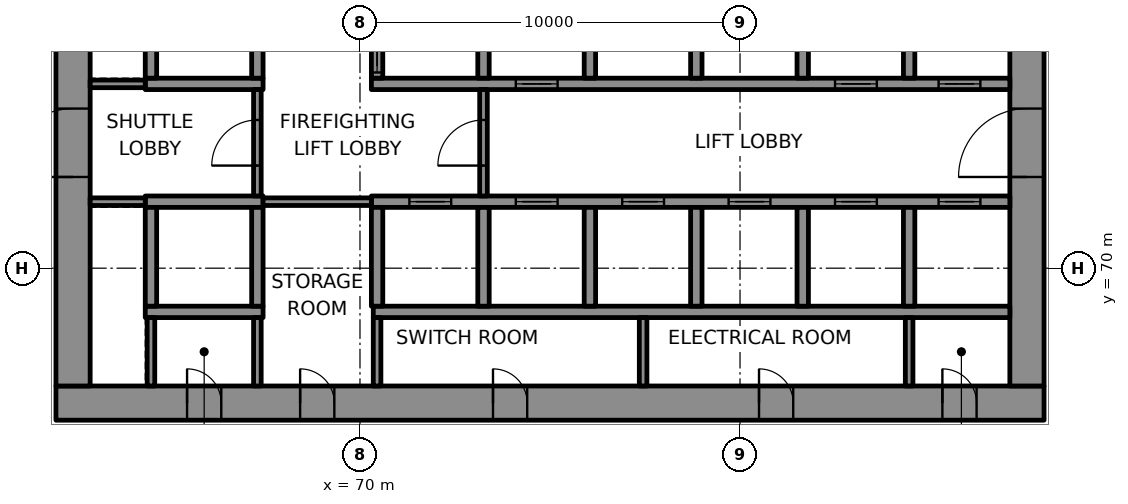
"""IFC4 building model, lengths in metres.
Left out: names, types, materials, properties, quantities, classifications, styles, units other than length and angle.
Written with IfcOpenShell. Run it as: python <this file> out.ifc"""

import sys

from ifc_helpers import new_model, si_unit, direction, frame, frame_2d, origin, place, context, subcontext, project, spatial, rectangle, extrude, element, fill, save


model = new_model("IFC4")
c1 = context("Model", 3, precision=1e-05, world=origin(), true_north=direction((0.0, 1.0)))
c2 = subcontext(c1, "Body", "Model", "MODEL_VIEW")
j1 = project(units=[si_unit("LENGTHUNIT", "METRE"), si_unit("PLANEANGLEUNIT", "RADIAN")], contexts=[c1])
p1 = place(None, origin())
s1 = spatial("IfcSite", under=j1, at=p1, CompositionType="ELEMENT")
p2 = place(p1, origin())
s2 = spatial("IfcBuilding", under=s1, at=p2, CompositionType="ELEMENT")
p3 = place(p2, frame((0.0, 0.0, 56.8)))
s3 = spatial("IfcBuildingStorey", under=s2, at=p3, CompositionType="ELEMENT", Elevation=56.8)
p4 = place(p3, frame((62.0, 66.45, 0.0), z_axis=(0.0, 0.0, 1.0), x_axis=(1.0, 0.0, 0.0)))
e1 = element("IfcWall", 1, at=p4, inside=s3, PredefinedType="SHEAR", context=c2, shape_type="SweptSolid", body=[
    extrude(rectangle(XDim=26.0, YDim=0.9, at=frame_2d((13.0, 0.0))), origin(), (0.0, 0.0, 1.0), 4.0),
])
p5 = place(p4, frame((3.45, 0.0, 0.0)))
e2 = element("IfcOpeningElement", 2, at=p5, cuts=e1, PredefinedType="OPENING", context=c2, shape_type="SweptSolid", body=[
    extrude(rectangle(XDim=0.9, YDim=2.1, at=frame_2d((0.45, 1.05))), frame((0.0, 0.46, 0.0), z_axis=(0.0, -1.0, 0.0), x_axis=(1.0, 0.0, 0.0)), (0.0, 0.0, 1.0), 0.92),
])
p6 = place(p4, frame((6.425, 0.0, 0.0)))
e3 = element("IfcOpeningElement", 3, at=p6, cuts=e1, PredefinedType="OPENING", context=c2, shape_type="SweptSolid", body=[
    extrude(rectangle(XDim=0.9, YDim=2.1, at=frame_2d((0.45, 1.05))), frame((0.0, 0.46, 0.0), z_axis=(0.0, -1.0, 0.0), x_axis=(1.0, 0.0, 0.0)), (0.0, 0.0, 1.0), 0.92),
])
p7 = place(p4, frame((11.5, 0.0, 0.0)))
e4 = element("IfcOpeningElement", 4, at=p7, cuts=e1, PredefinedType="OPENING", context=c2, shape_type="SweptSolid", body=[
    extrude(rectangle(XDim=0.9, YDim=2.1, at=frame_2d((0.45, 1.05))), frame((0.0, 0.46, 0.0), z_axis=(0.0, -1.0, 0.0), x_axis=(1.0, 0.0, 0.0)), (0.0, 0.0, 1.0), 0.92),
])
p8 = place(p4, frame((18.5, 0.0, 0.0)))
e5 = element("IfcOpeningElement", 5, at=p8, cuts=e1, PredefinedType="OPENING", context=c2, shape_type="SweptSolid", body=[
    extrude(rectangle(XDim=0.9, YDim=2.1, at=frame_2d((0.45, 1.05))), frame((0.0, 0.46, 0.0), z_axis=(0.0, -1.0, 0.0), x_axis=(1.0, 0.0, 0.0)), (0.0, 0.0, 1.0), 0.92),
])
p9 = place(p4, frame((23.325, 0.0, 0.0)))
e6 = element("IfcOpeningElement", 6, at=p9, cuts=e1, PredefinedType="OPENING", context=c2, shape_type="SweptSolid", body=[
    extrude(rectangle(XDim=0.9, YDim=2.1, at=frame_2d((0.45, 1.05))), frame((0.0, 0.46, 0.0), z_axis=(0.0, -1.0, 0.0), x_axis=(1.0, 0.0, 0.0)), (0.0, 0.0, 1.0), 0.92),
])
p10 = place(p3, frame((62.45, 66.9, 0.0), z_axis=(0.0, 0.0, 1.0), x_axis=(0.0, 1.0, 0.0)))
e7 = element("IfcWall", 7, at=p10, inside=s3, PredefinedType="SHEAR", context=c2, shape_type="SweptSolid", body=[
    extrude(rectangle(XDim=16.2, YDim=0.9, at=frame_2d((8.1, 0.0))), origin(), (0.0, 0.0, 1.0), 4.0),
])
p11 = place(p10, frame((5.5, 0.0, 0.0)))
e8 = element("IfcOpeningElement", 8, at=p11, cuts=e7, PredefinedType="OPENING", context=c2, shape_type="SweptSolid", body=[
    extrude(rectangle(XDim=1.8, YDim=2.1, at=frame_2d((0.9, 1.05))), frame((0.0, 0.46, 0.0), z_axis=(0.0, -1.0, 0.0), x_axis=(1.0, 0.0, 0.0)), (0.0, 0.0, 1.0), 0.92),
])
p12 = place(p3, frame((87.55, 66.9, 0.0), z_axis=(0.0, 0.0, 1.0), x_axis=(0.0, 1.0, 0.0)))
e9 = element("IfcWall", 9, at=p12, inside=s3, PredefinedType="SHEAR", context=c2, shape_type="SweptSolid", body=[
    extrude(rectangle(XDim=16.2, YDim=0.9, at=frame_2d((8.1, 0.0))), origin(), (0.0, 0.0, 1.0), 4.0),
])
p13 = place(p12, frame((5.5, 0.0, 0.0)))
e10 = element("IfcOpeningElement", 10, at=p13, cuts=e9, PredefinedType="OPENING", context=c2, shape_type="SweptSolid", body=[
    extrude(rectangle(XDim=1.8, YDim=2.1, at=frame_2d((0.9, 1.05))), frame((0.0, 0.46, 0.0), z_axis=(0.0, -1.0, 0.0), x_axis=(1.0, 0.0, 0.0)), (0.0, 0.0, 1.0), 0.92),
])
p14 = place(p12, frame((12.272, 0.0, 0.0)))
e11 = element("IfcOpeningElement", 11, at=p14, cuts=e9, PredefinedType="OPENING", context=c2, shape_type="SweptSolid", body=[
    extrude(rectangle(XDim=0.9, YDim=2.1, at=frame_2d((0.45, 1.05))), frame((0.0, 0.46, 0.0), z_axis=(0.0, -1.0, 0.0), x_axis=(1.0, 0.0, 0.0)), (0.0, 0.0, 1.0), 0.92),
])
p15 = place(p3, frame((64.35, 68.85, 0.0), z_axis=(0.0, 0.0, 1.0), x_axis=(1.0, 0.0, 0.0)))
e12 = element("IfcWall", 12, at=p15, inside=s3, PredefinedType="SHEAR", context=c2, shape_type="SweptSolid", body=[
    extrude(rectangle(XDim=3.1, YDim=0.3, at=frame_2d((1.55, 0.0))), origin(), (0.0, 0.0, 1.0), 4.0),
])
p16 = place(p3, frame((70.35, 68.85, 0.0), z_axis=(0.0, 0.0, 1.0), x_axis=(1.0, 0.0, 0.0)))
e13 = element("IfcWall", 13, at=p16, inside=s3, PredefinedType="SHEAR", context=c2, shape_type="SweptSolid", body=[
    extrude(rectangle(XDim=16.75, YDim=0.3, at=frame_2d((8.375, 0.0))), origin(), (0.0, 0.0, 1.0), 4.0),
])
p17 = place(p3, frame((64.35, 71.75, 0.0), z_axis=(0.0, 0.0, 1.0), x_axis=(1.0, 0.0, 0.0)))
e14 = element("IfcWall", 14, at=p17, inside=s3, PredefinedType="SHEAR", context=c2, shape_type="SweptSolid", body=[
    extrude(rectangle(XDim=3.1, YDim=0.3, at=frame_2d((1.55, 0.0))), origin(), (0.0, 0.0, 1.0), 4.0),
])
p18 = place(p3, frame((70.3, 71.75, 0.0), z_axis=(0.0, 0.0, 1.0), x_axis=(1.0, 0.0, 0.0)))
e15 = element("IfcWall", 15, at=p18, inside=s3, PredefinedType="SHEAR", context=c2, shape_type="SweptSolid", body=[
    extrude(rectangle(XDim=16.8, YDim=0.3, at=frame_2d((8.4, 0.0))), origin(), (0.0, 0.0, 1.0), 4.0),
])
p19 = place(p18, frame((1.0, 0.0, 0.0)))
e16 = element("IfcOpeningElement", 16, at=p19, cuts=e15, PredefinedType="OPENING", context=c2, shape_type="SweptSolid", body=[
    extrude(rectangle(XDim=1.1, YDim=2.1, at=frame_2d((0.55, 1.05))), frame((0.0, 0.16, 0.0), z_axis=(0.0, -1.0, 0.0), x_axis=(1.0, 0.0, 0.0)), (0.0, 0.0, 1.0), 0.32),
])
p20 = place(p18, frame((3.8, 0.0, 0.0)))
e17 = element("IfcOpeningElement", 17, at=p20, cuts=e15, PredefinedType="OPENING", context=c2, shape_type="SweptSolid", body=[
    extrude(rectangle(XDim=1.1, YDim=2.1, at=frame_2d((0.55, 1.05))), frame((0.0, 0.16, 0.0), z_axis=(0.0, -1.0, 0.0), x_axis=(1.0, 0.0, 0.0)), (0.0, 0.0, 1.0), 0.32),
])
p21 = place(p18, frame((6.6, 0.0, 0.0)))
e18 = element("IfcOpeningElement", 18, at=p21, cuts=e15, PredefinedType="OPENING", context=c2, shape_type="SweptSolid", body=[
    extrude(rectangle(XDim=1.1, YDim=2.1, at=frame_2d((0.55, 1.05))), frame((0.0, 0.16, 0.0), z_axis=(0.0, -1.0, 0.0), x_axis=(1.0, 0.0, 0.0)), (0.0, 0.0, 1.0), 0.32),
])
p22 = place(p18, frame((9.4, 0.0, 0.0)))
e19 = element("IfcOpeningElement", 19, at=p22, cuts=e15, PredefinedType="OPENING", context=c2, shape_type="SweptSolid", body=[
    extrude(rectangle(XDim=1.1, YDim=2.1, at=frame_2d((0.55, 1.05))), frame((0.0, 0.16, 0.0), z_axis=(0.0, -1.0, 0.0), x_axis=(1.0, 0.0, 0.0)), (0.0, 0.0, 1.0), 0.32),
])
p23 = place(p18, frame((12.2, 0.0, 0.0)))
e20 = element("IfcOpeningElement", 20, at=p23, cuts=e15, PredefinedType="OPENING", context=c2, shape_type="SweptSolid", body=[
    extrude(rectangle(XDim=1.1, YDim=2.1, at=frame_2d((0.55, 1.05))), frame((0.0, 0.16, 0.0), z_axis=(0.0, -1.0, 0.0), x_axis=(1.0, 0.0, 0.0)), (0.0, 0.0, 1.0), 0.32),
])
p24 = place(p18, frame((14.925, 0.0, 0.0)))
e21 = element("IfcOpeningElement", 21, at=p24, cuts=e15, PredefinedType="OPENING", context=c2, shape_type="SweptSolid", body=[
    extrude(rectangle(XDim=1.1, YDim=2.1, at=frame_2d((0.55, 1.05))), frame((0.0, 0.16, 0.0), z_axis=(0.0, -1.0, 0.0), x_axis=(1.0, 0.0, 0.0)), (0.0, 0.0, 1.0), 0.32),
])
p25 = place(p3, frame((64.35, 74.85, 0.0), z_axis=(0.0, 0.0, 1.0), x_axis=(1.0, 0.0, 0.0)))
e22 = element("IfcWall", 22, at=p25, inside=s3, PredefinedType="SHEAR", context=c2, shape_type="SweptSolid", body=[
    extrude(rectangle(XDim=3.1, YDim=0.3, at=frame_2d((1.55, 0.0))), origin(), (0.0, 0.0, 1.0), 4.0),
])
p26 = place(p3, frame((70.3, 74.85, 0.0), z_axis=(0.0, 0.0, 1.0), x_axis=(1.0, 0.0, 0.0)))
e23 = element("IfcWall", 23, at=p26, inside=s3, PredefinedType="SHEAR", context=c2, shape_type="SweptSolid", body=[
    extrude(rectangle(XDim=16.8, YDim=0.3, at=frame_2d((8.4, 0.0))), origin(), (0.0, 0.0, 1.0), 4.0),
])
p27 = place(p26, frame((3.8, 0.0, 0.0)))
e24 = element("IfcOpeningElement", 24, at=p27, cuts=e23, PredefinedType="OPENING", context=c2, shape_type="SweptSolid", body=[
    extrude(rectangle(XDim=1.1, YDim=2.1, at=frame_2d((0.55, 1.05))), frame((0.0, 0.16, 0.0), z_axis=(0.0, -1.0, 0.0), x_axis=(1.0, 0.0, 0.0)), (0.0, 0.0, 1.0), 0.32),
])
p28 = place(p26, frame((12.2, 0.0, 0.0)))
e25 = element("IfcOpeningElement", 25, at=p28, cuts=e23, PredefinedType="OPENING", context=c2, shape_type="SweptSolid", body=[
    extrude(rectangle(XDim=1.1, YDim=2.1, at=frame_2d((0.55, 1.05))), frame((0.0, 0.16, 0.0), z_axis=(0.0, -1.0, 0.0), x_axis=(1.0, 0.0, 0.0)), (0.0, 0.0, 1.0), 0.32),
])
p29 = place(p26, frame((14.925, 0.0, 0.0)))
e26 = element("IfcOpeningElement", 26, at=p29, cuts=e23, PredefinedType="OPENING", context=c2, shape_type="SweptSolid", body=[
    extrude(rectangle(XDim=1.1, YDim=2.1, at=frame_2d((0.55, 1.05))), frame((0.0, 0.16, 0.0), z_axis=(0.0, -1.0, 0.0), x_axis=(1.0, 0.0, 0.0)), (0.0, 0.0, 1.0), 0.32),
])
for number, where, z_axis, x_axis in (
    (27, (64.5, 69.0, 0.0), (0.0, 0.0, 1.0), (0.0, 1.0, 0.0)),
    (28, (64.5, 75.0, 0.0), (0.0, 0.0, 1.0), (0.0, 1.0, 0.0)),
    (29, (67.3, 69.0, 0.0), (0.0, 0.0, 1.0), (0.0, 1.0, 0.0)),
    (30, (67.3, 75.0, 0.0), (0.0, 0.0, 1.0), (0.0, 1.0, 0.0)),
    (31, (70.45, 69.0, 0.0), (0.0, 0.0, 1.0), (0.0, 1.0, 0.0)),
):
    element("IfcWall", number, at=place(p3, frame(where, z_axis=z_axis, x_axis=x_axis)), inside=s3, PredefinedType="SHEAR", context=c2, shape_type="SweptSolid", body=[
        extrude(rectangle(XDim=2.6, YDim=0.3, at=frame_2d((1.3, 0.0))), origin(), (0.0, 0.0, 1.0), 4.0),
    ])
p30 = place(p3, frame((70.45, 75.0, 0.0), z_axis=(0.0, 0.0, 1.0), x_axis=(0.0, 1.0, 0.0)))
e32 = element("IfcWall", 32, at=p30, inside=s3, PredefinedType="SHEAR", context=c2, shape_type="SweptSolid", body=[
    extrude(rectangle(XDim=2.6, YDim=0.3, at=frame_2d((1.3, 0.0))), origin(), (0.0, 0.0, 1.0), 4.0),
])
p31 = place(p30, frame((0.15, 0.0, 0.0)))
e33 = element("IfcOpeningElement", 33, at=p31, cuts=e32, PredefinedType="OPENING", context=c2, shape_type="SweptSolid", body=[
    extrude(rectangle(XDim=1.1, YDim=2.1, at=frame_2d((0.55, 1.05))), frame((0.0, 0.16, 0.0), z_axis=(0.0, -1.0, 0.0), x_axis=(1.0, 0.0, 0.0)), (0.0, 0.0, 1.0), 0.32),
])
for number, where, z_axis, x_axis in (
    (34, (73.25, 69.0, 0.0), (0.0, 0.0, 1.0), (0.0, 1.0, 0.0)),
    (35, (73.25, 75.0, 0.0), (0.0, 0.0, 1.0), (0.0, 1.0, 0.0)),
    (36, (76.05, 69.0, 0.0), (0.0, 0.0, 1.0), (0.0, 1.0, 0.0)),
    (37, (76.05, 75.0, 0.0), (0.0, 0.0, 1.0), (0.0, 1.0, 0.0)),
    (38, (78.85, 69.0, 0.0), (0.0, 0.0, 1.0), (0.0, 1.0, 0.0)),
    (39, (78.85, 75.0, 0.0), (0.0, 0.0, 1.0), (0.0, 1.0, 0.0)),
    (40, (81.65, 69.0, 0.0), (0.0, 0.0, 1.0), (0.0, 1.0, 0.0)),
    (41, (81.65, 75.0, 0.0), (0.0, 0.0, 1.0), (0.0, 1.0, 0.0)),
    (42, (84.45, 69.0, 0.0), (0.0, 0.0, 1.0), (0.0, 1.0, 0.0)),
    (43, (84.45, 75.0, 0.0), (0.0, 0.0, 1.0), (0.0, 1.0, 0.0)),
):
    element("IfcWall", number, at=place(p3, frame(where, z_axis=z_axis, x_axis=x_axis)), inside=s3, PredefinedType="SHEAR", context=c2, shape_type="SweptSolid", body=[
        extrude(rectangle(XDim=2.6, YDim=0.3, at=frame_2d((1.3, 0.0))), origin(), (0.0, 0.0, 1.0), 4.0),
    ])
p32 = place(p3, frame((62.9, 71.75, 0.0), z_axis=(0.0, 0.0, 1.0), x_axis=(1.0, 0.0, 0.0)))
e44 = element("IfcWall", 44, at=p32, inside=s3, PredefinedType="PARTITIONING", context=c2, shape_type="SweptSolid", body=[
    extrude(rectangle(XDim=1.45, YDim=0.2, at=frame_2d((0.725, 0.0))), origin(), (0.0, 0.0, 1.0), 4.0),
])
p33 = place(p3, frame((67.45, 71.75, 0.0), z_axis=(0.0, 0.0, 1.0), x_axis=(1.0, 0.0, 0.0)))
e45 = element("IfcWall", 45, at=p33, inside=s3, PredefinedType="PARTITIONING", context=c2, shape_type="SweptSolid", body=[
    extrude(rectangle(XDim=2.85, YDim=0.2, at=frame_2d((1.425, 0.0))), origin(), (0.0, 0.0, 1.0), 4.0),
])
p34 = place(p3, frame((62.9, 74.85, 0.0), z_axis=(0.0, 0.0, 1.0), x_axis=(1.0, 0.0, 0.0)))
e46 = element("IfcWall", 46, at=p34, inside=s3, PredefinedType="PARTITIONING", context=c2, shape_type="SweptSolid", body=[
    extrude(rectangle(XDim=1.45, YDim=0.2, at=frame_2d((0.725, 0.0))), origin(), (0.0, 0.0, 1.0), 4.0),
])
for number, where, z_axis, x_axis in (
    (47, (64.5, 66.9, 0.0), (0.0, 0.0, 1.0), (0.0, 1.0, 0.0)),
    (48, (67.3, 66.9, 0.0), (0.0, 0.0, 1.0), (0.0, 1.0, 0.0)),
):
    element("IfcWall", number, at=place(p3, frame(where, z_axis=z_axis, x_axis=x_axis)), inside=s3, PredefinedType="PARTITIONING", context=c2, shape_type="SweptSolid", body=[
        extrude(rectangle(XDim=1.8, YDim=0.2, at=frame_2d((0.9, 0.0))), origin(), (0.0, 0.0, 1.0), 4.0),
    ])
p35 = place(p3, frame((67.3, 71.9, 0.0), z_axis=(0.0, 0.0, 1.0), x_axis=(0.0, 1.0, 0.0)))
e49 = element("IfcWall", 49, at=p35, inside=s3, PredefinedType="PARTITIONING", context=c2, shape_type="SweptSolid", body=[
    extrude(rectangle(XDim=2.8, YDim=0.2, at=frame_2d((1.4, 0.0))), origin(), (0.0, 0.0, 1.0), 4.0),
])
p36 = place(p35, frame((0.8, 0.0, 0.0)))
e50 = element("IfcOpeningElement", 50, at=p36, cuts=e49, PredefinedType="OPENING", context=c2, shape_type="SweptSolid", body=[
    extrude(rectangle(XDim=1.2, YDim=2.1, at=frame_2d((0.6, 1.05))), frame((0.0, 0.11, 0.0), z_axis=(0.0, -1.0, 0.0), x_axis=(1.0, 0.0, 0.0)), (0.0, 0.0, 1.0), 0.22),
])
p37 = place(p3, frame((70.45, 66.9, 0.0), z_axis=(0.0, 0.0, 1.0), x_axis=(0.0, 1.0, 0.0)))
e51 = element("IfcWall", 51, at=p37, inside=s3, PredefinedType="PARTITIONING", context=c2, shape_type="SweptSolid", body=[
    extrude(rectangle(XDim=1.8, YDim=0.2, at=frame_2d((0.9, 0.0))), origin(), (0.0, 0.0, 1.0), 4.0),
])
p38 = place(p3, frame((73.25, 71.9, 0.0), z_axis=(0.0, 0.0, 1.0), x_axis=(0.0, 1.0, 0.0)))
e52 = element("IfcWall", 52, at=p38, inside=s3, PredefinedType="PARTITIONING", context=c2, shape_type="SweptSolid", body=[
    extrude(rectangle(XDim=2.8, YDim=0.2, at=frame_2d((1.4, 0.0))), origin(), (0.0, 0.0, 1.0), 4.0),
])
p39 = place(p38, frame((0.8, 0.0, 0.0)))
e53 = element("IfcOpeningElement", 53, at=p39, cuts=e52, PredefinedType="OPENING", context=c2, shape_type="SweptSolid", body=[
    extrude(rectangle(XDim=1.2, YDim=2.1, at=frame_2d((0.6, 1.05))), frame((0.0, 0.11, 0.0), z_axis=(0.0, -1.0, 0.0), x_axis=(1.0, 0.0, 0.0)), (0.0, 0.0, 1.0), 0.22),
])
for number, where, z_axis, x_axis in (
    (54, (77.45, 66.9, 0.0), (0.0, 0.0, 1.0), (0.0, 1.0, 0.0)),
    (55, (84.45, 66.9, 0.0), (0.0, 0.0, 1.0), (0.0, 1.0, 0.0)),
):
    element("IfcWall", number, at=place(p3, frame(where, z_axis=z_axis, x_axis=x_axis)), inside=s3, PredefinedType="PARTITIONING", context=c2, shape_type="SweptSolid", body=[
        extrude(rectangle(XDim=1.8, YDim=0.2, at=frame_2d((0.9, 0.0))), origin(), (0.0, 0.0, 1.0), 4.0),
    ])
p40 = place(p19, origin())
e56 = element("IfcDoor", 56, at=p40, inside=s3, OperationType="DOUBLE_DOOR_SLIDING", PredefinedType="DOOR", context=c2, shape_type="SweptSolid", body=[
    extrude(rectangle(XDim=1.1, YDim=2.1, at=frame_2d((0.55, 1.05))), frame((0.0, 0.025, 0.0), z_axis=(0.0, -1.0, 0.0), x_axis=(1.0, 0.0, 0.0)), (0.0, 0.0, 1.0), 0.05),
])
fill(e16, e56)
p41 = place(p20, origin())
e57 = element("IfcDoor", 57, at=p41, inside=s3, OperationType="DOUBLE_DOOR_SLIDING", PredefinedType="DOOR", context=c2, shape_type="SweptSolid", body=[
    extrude(rectangle(XDim=1.1, YDim=2.1, at=frame_2d((0.55, 1.05))), frame((0.0, 0.025, 0.0), z_axis=(0.0, -1.0, 0.0), x_axis=(1.0, 0.0, 0.0)), (0.0, 0.0, 1.0), 0.05),
])
fill(e17, e57)
p42 = place(p21, origin())
e58 = element("IfcDoor", 58, at=p42, inside=s3, OperationType="DOUBLE_DOOR_SLIDING", PredefinedType="DOOR", context=c2, shape_type="SweptSolid", body=[
    extrude(rectangle(XDim=1.1, YDim=2.1, at=frame_2d((0.55, 1.05))), frame((0.0, 0.025, 0.0), z_axis=(0.0, -1.0, 0.0), x_axis=(1.0, 0.0, 0.0)), (0.0, 0.0, 1.0), 0.05),
])
fill(e18, e58)
p43 = place(p22, origin())
e59 = element("IfcDoor", 59, at=p43, inside=s3, OperationType="DOUBLE_DOOR_SLIDING", PredefinedType="DOOR", context=c2, shape_type="SweptSolid", body=[
    extrude(rectangle(XDim=1.1, YDim=2.1, at=frame_2d((0.55, 1.05))), frame((0.0, 0.025, 0.0), z_axis=(0.0, -1.0, 0.0), x_axis=(1.0, 0.0, 0.0)), (0.0, 0.0, 1.0), 0.05),
])
fill(e19, e59)
p44 = place(p23, origin())
e60 = element("IfcDoor", 60, at=p44, inside=s3, OperationType="DOUBLE_DOOR_SLIDING", PredefinedType="DOOR", context=c2, shape_type="SweptSolid", body=[
    extrude(rectangle(XDim=1.1, YDim=2.1, at=frame_2d((0.55, 1.05))), frame((0.0, 0.025, 0.0), z_axis=(0.0, -1.0, 0.0), x_axis=(1.0, 0.0, 0.0)), (0.0, 0.0, 1.0), 0.05),
])
fill(e20, e60)
p45 = place(p24, origin())
e61 = element("IfcDoor", 61, at=p45, inside=s3, OperationType="DOUBLE_DOOR_SLIDING", PredefinedType="DOOR", context=c2, shape_type="SweptSolid", body=[
    extrude(rectangle(XDim=1.1, YDim=2.1, at=frame_2d((0.55, 1.05))), frame((0.0, 0.025, 0.0), z_axis=(0.0, -1.0, 0.0), x_axis=(1.0, 0.0, 0.0)), (0.0, 0.0, 1.0), 0.05),
])
fill(e21, e61)
p46 = place(p31, origin())
e62 = element("IfcDoor", 62, at=p46, inside=s3, OperationType="DOUBLE_DOOR_SLIDING", PredefinedType="DOOR", context=c2, shape_type="SweptSolid", body=[
    extrude(rectangle(XDim=1.1, YDim=2.1, at=frame_2d((0.55, 1.05))), frame((0.0, 0.025, 0.0), z_axis=(0.0, -1.0, 0.0), x_axis=(1.0, 0.0, 0.0)), (0.0, 0.0, 1.0), 0.05),
])
fill(e33, e62)
p47 = place(p27, origin())
e63 = element("IfcDoor", 63, at=p47, inside=s3, OperationType="DOUBLE_DOOR_SLIDING", PredefinedType="DOOR", context=c2, shape_type="SweptSolid", body=[
    extrude(rectangle(XDim=1.1, YDim=2.1, at=frame_2d((0.55, 1.05))), frame((0.0, 0.025, 0.0), z_axis=(0.0, -1.0, 0.0), x_axis=(1.0, 0.0, 0.0)), (0.0, 0.0, 1.0), 0.05),
])
fill(e24, e63)
p48 = place(p28, origin())
e64 = element("IfcDoor", 64, at=p48, inside=s3, OperationType="DOUBLE_DOOR_SLIDING", PredefinedType="DOOR", context=c2, shape_type="SweptSolid", body=[
    extrude(rectangle(XDim=1.1, YDim=2.1, at=frame_2d((0.55, 1.05))), frame((0.0, 0.025, 0.0), z_axis=(0.0, -1.0, 0.0), x_axis=(1.0, 0.0, 0.0)), (0.0, 0.0, 1.0), 0.05),
])
fill(e25, e64)
p49 = place(p29, origin())
e65 = element("IfcDoor", 65, at=p49, inside=s3, OperationType="DOUBLE_DOOR_SLIDING", PredefinedType="DOOR", context=c2, shape_type="SweptSolid", body=[
    extrude(rectangle(XDim=1.1, YDim=2.1, at=frame_2d((0.55, 1.05))), frame((0.0, 0.025, 0.0), z_axis=(0.0, -1.0, 0.0), x_axis=(1.0, 0.0, 0.0)), (0.0, 0.0, 1.0), 0.05),
])
fill(e26, e65)
p50 = place(p39, origin())
e66 = element("IfcDoor", 66, at=p50, inside=s3, OperationType="SINGLE_SWING_LEFT", PredefinedType="DOOR", context=c2, shape_type="SweptSolid", body=[
    extrude(rectangle(XDim=1.2, YDim=2.1, at=frame_2d((0.6, 1.05))), frame((0.0, 0.025, 0.0), z_axis=(0.0, -1.0, 0.0), x_axis=(1.0, 0.0, 0.0)), (0.0, 0.0, 1.0), 0.05),
])
fill(e53, e66)
p51 = place(p36, origin())
e67 = element("IfcDoor", 67, at=p51, inside=s3, OperationType="SINGLE_SWING_RIGHT", PredefinedType="DOOR", context=c2, shape_type="SweptSolid", body=[
    extrude(rectangle(XDim=1.2, YDim=2.1, at=frame_2d((0.6, 1.05))), frame((0.0, 0.025, 0.0), z_axis=(0.0, -1.0, 0.0), x_axis=(1.0, 0.0, 0.0)), (0.0, 0.0, 1.0), 0.05),
])
fill(e50, e67)
p52 = place(p11, origin())
e68 = element("IfcDoor", 68, at=p52, inside=s3, OperationType="SINGLE_SWING_LEFT", PredefinedType="DOOR", context=c2, shape_type="SweptSolid", body=[
    extrude(rectangle(XDim=1.8, YDim=2.1, at=frame_2d((0.9, 1.05))), frame((0.0, 0.17, 0.0), z_axis=(0.0, -1.0, 0.0), x_axis=(1.0, 0.0, 0.0)), (0.0, 0.0, 1.0), 0.34),
])
fill(e8, e68)
p53 = place(p13, origin())
e69 = element("IfcDoor", 69, at=p53, inside=s3, OperationType="SINGLE_SWING_RIGHT", PredefinedType="DOOR", context=c2, shape_type="SweptSolid", body=[
    extrude(rectangle(XDim=1.8, YDim=2.1, at=frame_2d((0.9, 1.05))), frame((0.0, 0.17, 0.0), z_axis=(0.0, -1.0, 0.0), x_axis=(1.0, 0.0, 0.0)), (0.0, 0.0, 1.0), 0.34),
])
fill(e10, e69)
p54 = place(p5, origin())
e70 = element("IfcDoor", 70, at=p54, inside=s3, OperationType="SINGLE_SWING_LEFT", PredefinedType="DOOR", context=c2, shape_type="SweptSolid", body=[
    extrude(rectangle(XDim=0.9, YDim=2.1, at=frame_2d((0.45, 1.05))), frame((0.0, 0.17, 0.0), z_axis=(0.0, -1.0, 0.0), x_axis=(1.0, 0.0, 0.0)), (0.0, 0.0, 1.0), 0.34),
])
fill(e2, e70)
p55 = place(p6, origin())
e71 = element("IfcDoor", 71, at=p55, inside=s3, OperationType="SINGLE_SWING_RIGHT", PredefinedType="DOOR", context=c2, shape_type="SweptSolid", body=[
    extrude(rectangle(XDim=0.9, YDim=2.1, at=frame_2d((0.45, 1.05))), frame((0.0, 0.17, 0.0), z_axis=(0.0, -1.0, 0.0), x_axis=(1.0, 0.0, 0.0)), (0.0, 0.0, 1.0), 0.34),
])
fill(e3, e71)
p56 = place(p7, origin())
e72 = element("IfcDoor", 72, at=p56, inside=s3, OperationType="SINGLE_SWING_LEFT", PredefinedType="DOOR", context=c2, shape_type="SweptSolid", body=[
    extrude(rectangle(XDim=0.9, YDim=2.1, at=frame_2d((0.45, 1.05))), frame((0.0, 0.17, 0.0), z_axis=(0.0, -1.0, 0.0), x_axis=(1.0, 0.0, 0.0)), (0.0, 0.0, 1.0), 0.34),
])
fill(e4, e72)
p57 = place(p8, origin())
e73 = element("IfcDoor", 73, at=p57, inside=s3, OperationType="SINGLE_SWING_RIGHT", PredefinedType="DOOR", context=c2, shape_type="SweptSolid", body=[
    extrude(rectangle(XDim=0.9, YDim=2.1, at=frame_2d((0.45, 1.05))), frame((0.0, 0.17, 0.0), z_axis=(0.0, -1.0, 0.0), x_axis=(1.0, 0.0, 0.0)), (0.0, 0.0, 1.0), 0.34),
])
fill(e5, e73)
p58 = place(p9, origin())
e74 = element("IfcDoor", 74, at=p58, inside=s3, OperationType="SINGLE_SWING_LEFT", PredefinedType="DOOR", context=c2, shape_type="SweptSolid", body=[
    extrude(rectangle(XDim=0.9, YDim=2.1, at=frame_2d((0.45, 1.05))), frame((0.0, 0.17, 0.0), z_axis=(0.0, -1.0, 0.0), x_axis=(1.0, 0.0, 0.0)), (0.0, 0.0, 1.0), 0.34),
])
fill(e6, e74)
save(model, sys.argv[1])
